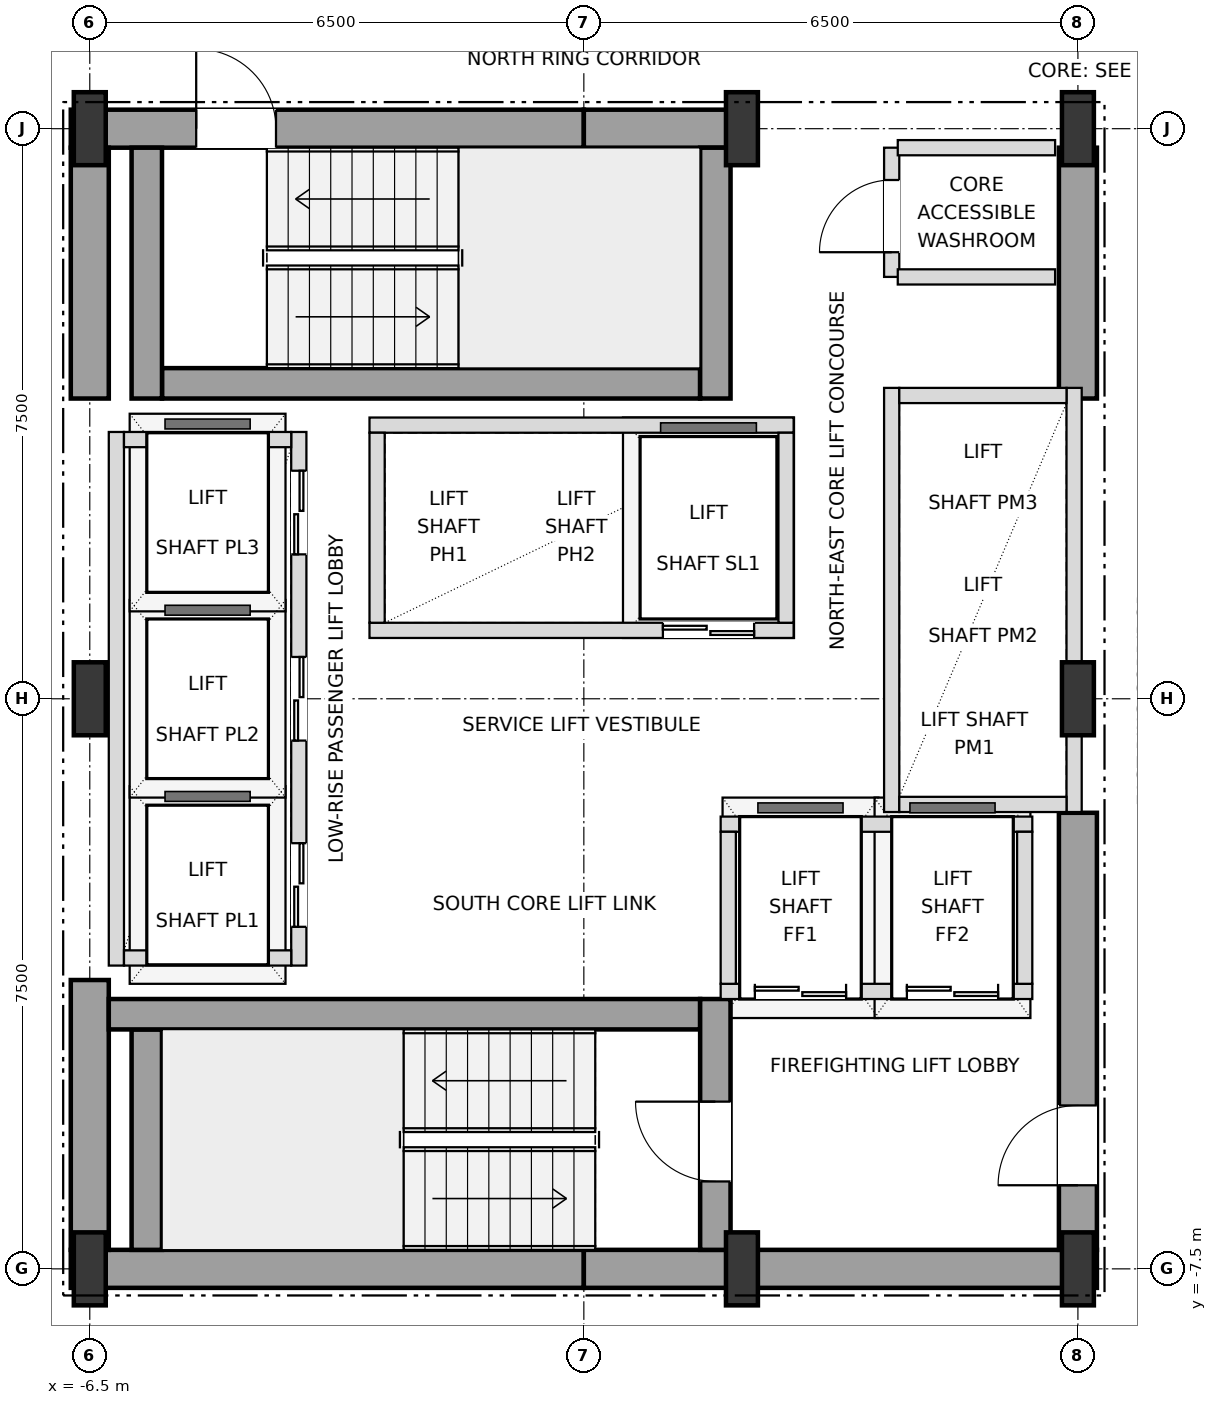
"""IFC4 building model, lengths in metres.
Left out: names, types, materials, properties, quantities, classifications, styles, units other than length and angle.
Written with IfcOpenShell. Run it as: python <this file> out.ifc"""

import sys

from ifc_helpers import new_model, si_unit, direction, frame, frame_2d, origin, origin_2d, place, context, subcontext, project, spatial, rectangle, i_section, extrude, element, fill, save


model = new_model("IFC4")
c1 = context("Model", 3, precision=1e-05, world=origin(), true_north=direction((0.0, 1.0)))
c2 = subcontext(c1, "Body", "Model", "MODEL_VIEW")
j1 = project(units=[si_unit("LENGTHUNIT", "METRE"), si_unit("PLANEANGLEUNIT", "RADIAN")], contexts=[c1])
p1 = place(None, origin())
s1 = spatial("IfcSite", under=j1, at=p1, CompositionType="ELEMENT")
p2 = place(p1, origin())
s2 = spatial("IfcBuilding", under=s1, at=p2, CompositionType="ELEMENT")
p3 = place(p2, frame((0.0, 0.0, 72.0)))
s3 = spatial("IfcBuildingStorey", under=s2, at=p3, CompositionType="ELEMENT", Elevation=72.0)
for number, where, z_axis, x_axis in (
    (1, (-6.5, -7.5, 0.0), (0.0, 0.0, 1.0), (1.0, 0.0, 0.0)),
    (2, (2.08, -7.5, 0.0), (0.0, 0.0, 1.0), (1.0, 0.0, 0.0)),
    (3, (6.5, -7.5, 0.0), (0.0, 0.0, 1.0), (1.0, 0.0, 0.0)),
    (4, (-6.5, 0.0, 0.0), (0.0, 0.0, 1.0), (1.0, 0.0, 0.0)),
    (5, (6.5, 0.0, 0.0), (0.0, 0.0, 1.0), (1.0, 0.0, 0.0)),
    (6, (-6.5, 7.5, 0.0), (0.0, 0.0, 1.0), (1.0, 0.0, 0.0)),
    (7, (2.08, 7.5, 0.0), (0.0, 0.0, 1.0), (1.0, 0.0, 0.0)),
    (8, (6.5, 7.5, 0.0), (0.0, 0.0, 1.0), (1.0, 0.0, 0.0)),
):
    element("IfcColumn", number, at=place(p3, frame(where, z_axis=z_axis, x_axis=x_axis)), inside=s3, PredefinedType="COLUMN", context=c2, shape_type="SweptSolid", body=[
        extrude(i_section(OverallWidth=0.42, OverallDepth=0.96, WebThickness=0.022, FlangeThickness=0.034, at=origin_2d()), origin(), (0.0, 0.0, 1.0), 3.6),
    ])
for number, where, z_axis, x_axis in (
    (9, (-6.75, -7.5, 0.0), (0.0, 0.0, 1.0), (1.0, 0.0, 0.0)),
    (10, (0.0, -7.5, 0.0), (0.0, 0.0, 1.0), (1.0, 0.0, 0.0)),
):
    element("IfcWall", number, at=place(p3, frame(where, z_axis=z_axis, x_axis=x_axis)), inside=s3, PredefinedType="SHEAR", context=c2, shape_type="SweptSolid", body=[
        extrude(rectangle(XDim=6.75, YDim=0.5, at=frame_2d((3.375, 0.0))), origin(), (0.0, 0.0, 1.0), 3.38),
    ])
p4 = place(p3, frame((-6.75, 7.5, 0.0), z_axis=(0.0, 0.0, 1.0), x_axis=(1.0, 0.0, 0.0)))
e11 = element("IfcWall", 11, at=p4, inside=s3, PredefinedType="SHEAR", context=c2, shape_type="SweptSolid", body=[
    extrude(rectangle(XDim=6.75, YDim=0.5, at=frame_2d((3.375, 0.0))), origin(), (0.0, 0.0, 1.0), 3.38),
])
p5 = place(p4, frame((1.65, 0.0, 0.0)))
e12 = element("IfcOpeningElement", 12, at=p5, cuts=e11, PredefinedType="OPENING", context=c2, shape_type="SweptSolid", body=[
    extrude(rectangle(XDim=1.05, YDim=2.15, at=frame_2d((0.525, 1.075))), frame((0.0, 0.26, 0.0), z_axis=(0.0, -1.0, 0.0), x_axis=(1.0, 0.0, 0.0)), (0.0, 0.0, 1.0), 0.52),
])
p6 = place(p3, frame((0.0, 7.5, 0.0), z_axis=(0.0, 0.0, 1.0), x_axis=(1.0, 0.0, 0.0)))
e13 = element("IfcWall", 13, at=p6, inside=s3, PredefinedType="SHEAR", context=c2, shape_type="SweptSolid", body=[
    extrude(rectangle(XDim=2.08, YDim=0.5, at=frame_2d((1.04, 0.0))), origin(), (0.0, 0.0, 1.0), 3.38),
])
p7 = place(p3, frame((-6.5, -7.25, 0.0), z_axis=(0.0, 0.0, 1.0), x_axis=(0.0, 1.0, 0.0)))
e14 = element("IfcWall", 14, at=p7, inside=s3, PredefinedType="SHEAR", context=c2, shape_type="SweptSolid", body=[
    extrude(rectangle(XDim=3.55, YDim=0.5, at=frame_2d((1.775, 0.0))), origin(), (0.0, 0.0, 1.0), 3.38),
])
p8 = place(p3, frame((-6.5, 3.95, 0.0), z_axis=(0.0, 0.0, 1.0), x_axis=(0.0, 1.0, 0.0)))
e15 = element("IfcWall", 15, at=p8, inside=s3, PredefinedType="SHEAR", context=c2, shape_type="SweptSolid", body=[
    extrude(rectangle(XDim=3.3, YDim=0.5, at=frame_2d((1.65, 0.0))), origin(), (0.0, 0.0, 1.0), 3.38),
])
p9 = place(p3, frame((6.5, -7.25, 0.0), z_axis=(0.0, 0.0, 1.0), x_axis=(0.0, 1.0, 0.0)))
e16 = element("IfcWall", 16, at=p9, inside=s3, PredefinedType="SHEAR", context=c2, shape_type="SweptSolid", body=[
    extrude(rectangle(XDim=5.75, YDim=0.5, at=frame_2d((2.875, 0.0))), origin(), (0.0, 0.0, 1.0), 3.38),
])
p10 = place(p9, frame((0.85, 0.0, 0.0)))
e17 = element("IfcOpeningElement", 17, at=p10, cuts=e16, PredefinedType="OPENING", context=c2, shape_type="SweptSolid", body=[
    extrude(rectangle(XDim=1.05, YDim=2.15, at=frame_2d((0.525, 1.075))), frame((0.0, 0.26, 0.0), z_axis=(0.0, -1.0, 0.0), x_axis=(1.0, 0.0, 0.0)), (0.0, 0.0, 1.0), 0.52),
])
p11 = place(p3, frame((6.5, 3.95, 0.0), z_axis=(0.0, 0.0, 1.0), x_axis=(0.0, 1.0, 0.0)))
e18 = element("IfcWall", 18, at=p11, inside=s3, PredefinedType="SHEAR", context=c2, shape_type="SweptSolid", body=[
    extrude(rectangle(XDim=3.3, YDim=0.5, at=frame_2d((1.65, 0.0))), origin(), (0.0, 0.0, 1.0), 3.38),
])
p12 = place(p3, frame((-5.75, -7.25, 0.0), z_axis=(0.0, 0.0, 1.0), x_axis=(0.0, 1.0, 0.0)))
e19 = element("IfcWall", 19, at=p12, inside=s3, PredefinedType="SHEAR", context=c2, shape_type="SweptSolid", body=[
    extrude(rectangle(XDim=2.9, YDim=0.4, at=frame_2d((1.45, 0.0))), origin(), (0.0, 0.0, 1.0), 3.38),
])
p13 = place(p3, frame((-6.25, -4.15, 0.0), z_axis=(0.0, 0.0, 1.0), x_axis=(1.0, 0.0, 0.0)))
e20 = element("IfcWall", 20, at=p13, inside=s3, PredefinedType="SHEAR", context=c2, shape_type="SweptSolid", body=[
    extrude(rectangle(XDim=7.78, YDim=0.4, at=frame_2d((3.89, 0.0))), origin(), (0.0, 0.0, 1.0), 3.38),
])
p14 = place(p3, frame((1.73, -7.25, 0.0), z_axis=(0.0, 0.0, 1.0), x_axis=(0.0, 1.0, 0.0)))
e21 = element("IfcWall", 21, at=p14, inside=s3, PredefinedType="SHEAR", context=c2, shape_type="SweptSolid", body=[
    extrude(rectangle(XDim=3.3, YDim=0.4, at=frame_2d((1.65, 0.0))), origin(), (0.0, 0.0, 1.0), 3.38),
])
p15 = place(p14, frame((0.9, 0.0, 0.0)))
e22 = element("IfcOpeningElement", 22, at=p15, cuts=e21, PredefinedType="OPENING", context=c2, shape_type="SweptSolid", body=[
    extrude(rectangle(XDim=1.05, YDim=2.15, at=frame_2d((0.525, 1.075))), frame((0.0, 0.21, 0.0), z_axis=(0.0, -1.0, 0.0), x_axis=(1.0, 0.0, 0.0)), (0.0, 0.0, 1.0), 0.42),
])
p16 = place(p3, frame((-5.55, 4.15, 0.0), z_axis=(0.0, 0.0, 1.0), x_axis=(1.0, 0.0, 0.0)))
e23 = element("IfcWall", 23, at=p16, inside=s3, PredefinedType="SHEAR", context=c2, shape_type="SweptSolid", body=[
    extrude(rectangle(XDim=7.08, YDim=0.4, at=frame_2d((3.54, 0.0))), origin(), (0.0, 0.0, 1.0), 3.38),
])
for number, where, z_axis, x_axis in (
    (24, (1.73, 3.95, 0.0), (0.0, 0.0, 1.0), (0.0, 1.0, 0.0)),
    (25, (-5.75, 3.95, 0.0), (0.0, 0.0, 1.0), (0.0, 1.0, 0.0)),
):
    element("IfcWall", number, at=place(p3, frame(where, z_axis=z_axis, x_axis=x_axis)), inside=s3, PredefinedType="SHEAR", context=c2, shape_type="SweptSolid", body=[
        extrude(rectangle(XDim=3.3, YDim=0.4, at=frame_2d((1.65, 0.0))), origin(), (0.0, 0.0, 1.0), 3.38),
    ])
p17 = place(p3, frame((-3.75, -3.51, 0.0), z_axis=(0.0, 0.0, 1.0), x_axis=(0.0, 1.0, 0.0)))
e26 = element("IfcWall", 26, at=p17, inside=s3, PredefinedType="SOLIDWALL", context=c2, shape_type="SweptSolid", body=[
    extrude(rectangle(XDim=7.02, YDim=0.2, at=frame_2d((3.51, 0.0))), origin(), (0.0, 0.0, 1.0), 3.38),
])
p18 = place(p17, frame((0.51, 0.0, 0.0)))
e27 = element("IfcOpeningElement", 27, at=p18, cuts=e26, PredefinedType="OPENING", context=c2, shape_type="SweptSolid", body=[
    extrude(rectangle(XDim=1.1, YDim=2.15, at=frame_2d((0.55, 1.075))), frame((0.0, 0.11, 0.0), z_axis=(0.0, -1.0, 0.0), x_axis=(1.0, 0.0, 0.0)), (0.0, 0.0, 1.0), 0.22),
])
p19 = place(p17, frame((2.96, 0.0, 0.0)))
e28 = element("IfcOpeningElement", 28, at=p19, cuts=e26, PredefinedType="OPENING", context=c2, shape_type="SweptSolid", body=[
    extrude(rectangle(XDim=1.1, YDim=2.15, at=frame_2d((0.55, 1.075))), frame((0.0, 0.11, 0.0), z_axis=(0.0, -1.0, 0.0), x_axis=(1.0, 0.0, 0.0)), (0.0, 0.0, 1.0), 0.22),
])
p20 = place(p17, frame((5.41, 0.0, 0.0)))
e29 = element("IfcOpeningElement", 29, at=p20, cuts=e26, PredefinedType="OPENING", context=c2, shape_type="SweptSolid", body=[
    extrude(rectangle(XDim=1.1, YDim=2.15, at=frame_2d((0.55, 1.075))), frame((0.0, 0.11, 0.0), z_axis=(0.0, -1.0, 0.0), x_axis=(1.0, 0.0, 0.0)), (0.0, 0.0, 1.0), 0.22),
])
p21 = place(p3, frame((-6.15, -3.51, 0.0), z_axis=(0.0, 0.0, 1.0), x_axis=(0.0, 1.0, 0.0)))
e30 = element("IfcWall", 30, at=p21, inside=s3, PredefinedType="SOLIDWALL", context=c2, shape_type="SweptSolid", body=[
    extrude(rectangle(XDim=7.02, YDim=0.2, at=frame_2d((3.51, 0.0))), origin(), (0.0, 0.0, 1.0), 3.38),
])
for number, where, z_axis, x_axis in (
    (31, (-6.05, -3.41, 0.0), (0.0, 0.0, 1.0), (1.0, 0.0, 0.0)),
    (32, (-6.05, 3.41, 0.0), (0.0, 0.0, 1.0), (1.0, 0.0, 0.0)),
):
    element("IfcWall", number, at=place(p3, frame(where, z_axis=z_axis, x_axis=x_axis)), inside=s3, PredefinedType="SOLIDWALL", context=c2, shape_type="SweptSolid", body=[
        extrude(rectangle(XDim=2.2, YDim=0.2, at=frame_2d((1.1, 0.0))), origin(), (0.0, 0.0, 1.0), 3.38),
    ])
p22 = place(p3, frame((4.05, -1.49, 0.0), z_axis=(0.0, 0.0, 1.0), x_axis=(0.0, 1.0, 0.0)))
e33 = element("IfcWall", 33, at=p22, inside=s3, PredefinedType="SOLIDWALL", context=c2, shape_type="SweptSolid", body=[
    extrude(rectangle(XDim=5.58, YDim=0.2, at=frame_2d((2.79, 0.0))), origin(), (0.0, 0.0, 1.0), 3.38),
])
p23 = place(p3, frame((6.45, -1.49, 0.0), z_axis=(0.0, 0.0, 1.0), x_axis=(0.0, 1.0, 0.0)))
e34 = element("IfcWall", 34, at=p23, inside=s3, PredefinedType="SOLIDWALL", context=c2, shape_type="SweptSolid", body=[
    extrude(rectangle(XDim=5.58, YDim=0.2, at=frame_2d((2.79, 0.0))), origin(), (0.0, 0.0, 1.0), 2.816),
])
for number, where, z_axis, x_axis in (
    (35, (4.15, -1.39, 0.0), (0.0, 0.0, 1.0), (1.0, 0.0, 0.0)),
    (36, (4.15, 3.99, 0.0), (0.0, 0.0, 1.0), (1.0, 0.0, 0.0)),
):
    element("IfcWall", number, at=place(p3, frame(where, z_axis=z_axis, x_axis=x_axis)), inside=s3, PredefinedType="SOLIDWALL", context=c2, shape_type="SweptSolid", body=[
        extrude(rectangle(XDim=2.2, YDim=0.2, at=frame_2d((1.1, 0.0))), origin(), (0.0, 0.0, 1.0), 3.38),
    ])
p24 = place(p3, frame((-2.82, 0.9, 0.0), z_axis=(0.0, 0.0, 1.0), x_axis=(1.0, 0.0, 0.0)))
e37 = element("IfcWall", 37, at=p24, inside=s3, PredefinedType="SOLIDWALL", context=c2, shape_type="SweptSolid", body=[
    extrude(rectangle(XDim=5.58, YDim=0.2, at=frame_2d((2.79, 0.0))), origin(), (0.0, 0.0, 1.0), 3.38),
])
p25 = place(p24, frame((3.86, 0.0, 0.0)))
e38 = element("IfcOpeningElement", 38, at=p25, cuts=e37, PredefinedType="OPENING", context=c2, shape_type="SweptSolid", body=[
    extrude(rectangle(XDim=1.2, YDim=2.2, at=frame_2d((0.6, 1.1))), frame((0.0, 0.11, 0.0), z_axis=(0.0, -1.0, 0.0), x_axis=(1.0, 0.0, 0.0)), (0.0, 0.0, 1.0), 0.22),
])
p26 = place(p3, frame((-2.82, 3.6, 0.0), z_axis=(0.0, 0.0, 1.0), x_axis=(1.0, 0.0, 0.0)))
e39 = element("IfcWall", 39, at=p26, inside=s3, PredefinedType="SOLIDWALL", context=c2, shape_type="SweptSolid", body=[
    extrude(rectangle(XDim=5.58, YDim=0.2, at=frame_2d((2.79, 0.0))), origin(), (0.0, 0.0, 1.0), 3.38),
])
for number, where, z_axis, x_axis in (
    (40, (-2.72, 1.0, 0.0), (0.0, 0.0, 1.0), (0.0, 1.0, 0.0)),
    (41, (2.66, 1.0, 0.0), (0.0, 0.0, 1.0), (0.0, 1.0, 0.0)),
):
    element("IfcWall", number, at=place(p3, frame(where, z_axis=z_axis, x_axis=x_axis)), inside=s3, PredefinedType="SOLIDWALL", context=c2, shape_type="SweptSolid", body=[
        extrude(rectangle(XDim=2.5, YDim=0.2, at=frame_2d((1.25, 0.0))), origin(), (0.0, 0.0, 1.0), 3.38),
    ])
p27 = place(p3, frame((1.8, -3.85, 0.0), z_axis=(0.0, 0.0, 1.0), x_axis=(1.0, 0.0, 0.0)))
e42 = element("IfcWall", 42, at=p27, inside=s3, PredefinedType="SOLIDWALL", context=c2, shape_type="SweptSolid", body=[
    extrude(rectangle(XDim=4.1, YDim=0.2, at=frame_2d((2.05, 0.0))), origin(), (0.0, 0.0, 1.0), 3.38),
])
p28 = place(p27, frame((0.45, 0.0, 0.0)))
e43 = element("IfcOpeningElement", 43, at=p28, cuts=e42, PredefinedType="OPENING", context=c2, shape_type="SweptSolid", body=[
    extrude(rectangle(XDim=1.2, YDim=2.2, at=frame_2d((0.6, 1.1))), frame((0.0, 0.11, 0.0), z_axis=(0.0, -1.0, 0.0), x_axis=(1.0, 0.0, 0.0)), (0.0, 0.0, 1.0), 0.22),
])
p29 = place(p27, frame((2.45, 0.0, 0.0)))
e44 = element("IfcOpeningElement", 44, at=p29, cuts=e42, PredefinedType="OPENING", context=c2, shape_type="SweptSolid", body=[
    extrude(rectangle(XDim=1.2, YDim=2.2, at=frame_2d((0.6, 1.1))), frame((0.0, 0.11, 0.0), z_axis=(0.0, -1.0, 0.0), x_axis=(1.0, 0.0, 0.0)), (0.0, 0.0, 1.0), 0.22),
])
p30 = place(p3, frame((1.8, -1.65, 0.0), z_axis=(0.0, 0.0, 1.0), x_axis=(1.0, 0.0, 0.0)))
e45 = element("IfcWall", 45, at=p30, inside=s3, PredefinedType="SOLIDWALL", context=c2, shape_type="SweptSolid", body=[
    extrude(rectangle(XDim=4.1, YDim=0.2, at=frame_2d((2.05, 0.0))), origin(), (0.0, 0.0, 1.0), 3.38),
])
for number, where, z_axis, x_axis in (
    (46, (1.9, -3.75, 0.0), (0.0, 0.0, 1.0), (0.0, 1.0, 0.0)),
    (47, (5.8, -3.75, 0.0), (0.0, 0.0, 1.0), (0.0, 1.0, 0.0)),
):
    element("IfcWall", number, at=place(p3, frame(where, z_axis=z_axis, x_axis=x_axis)), inside=s3, PredefinedType="SOLIDWALL", context=c2, shape_type="SweptSolid", body=[
        extrude(rectangle(XDim=2.0, YDim=0.2, at=frame_2d((1.0, 0.0))), origin(), (0.0, 0.0, 1.0), 3.38),
    ])
p31 = place(p3, frame((4.05, 5.55, 0.0), z_axis=(0.0, 0.0, 1.0), x_axis=(0.0, 1.0, 0.0)))
e48 = element("IfcWall", 48, at=p31, inside=s3, PredefinedType="SOLIDWALL", context=c2, shape_type="SweptSolid", body=[
    extrude(rectangle(XDim=1.7, YDim=0.2, at=frame_2d((0.85, 0.0))), origin(), (0.0, 0.0, 1.0), 3.38),
])
p32 = place(p31, frame((0.325, 0.0, 0.0)))
e49 = element("IfcOpeningElement", 49, at=p32, cuts=e48, PredefinedType="OPENING", context=c2, shape_type="SweptSolid", body=[
    extrude(rectangle(XDim=0.95, YDim=2.15, at=frame_2d((0.475, 1.075))), frame((0.0, 0.11, 0.0), z_axis=(0.0, -1.0, 0.0), x_axis=(1.0, 0.0, 0.0)), (0.0, 0.0, 1.0), 0.22),
])
for number, where, z_axis, x_axis in (
    (50, (4.13, 5.55, 0.0), (0.0, 0.0, 1.0), (1.0, 0.0, 0.0)),
    (51, (4.13, 7.25, 0.0), (0.0, 0.0, 1.0), (1.0, 0.0, 0.0)),
):
    element("IfcWall", number, at=place(p3, frame(where, z_axis=z_axis, x_axis=x_axis)), inside=s3, PredefinedType="SOLIDWALL", context=c2, shape_type="SweptSolid", body=[
        extrude(rectangle(XDim=2.07, YDim=0.2, at=frame_2d((1.035, 0.0))), origin(), (0.0, 0.0, 1.0), 3.38),
    ])
p33 = place(p10, origin())
e52 = element("IfcDoor", 52, at=p33, inside=s3, OperationType="SINGLE_SWING_LEFT", PredefinedType="DOOR", context=c2, shape_type="SweptSolid", body=[
    extrude(rectangle(XDim=1.05, YDim=2.15, at=frame_2d((0.525, 1.075))), frame((0.0, 0.025, 0.0), z_axis=(0.0, -1.0, 0.0), x_axis=(1.0, 0.0, 0.0)), (0.0, 0.0, 1.0), 0.05),
])
fill(e17, e52)
p34 = place(p15, origin())
e53 = element("IfcDoor", 53, at=p34, inside=s3, OperationType="SINGLE_SWING_RIGHT", PredefinedType="DOOR", context=c2, shape_type="SweptSolid", body=[
    extrude(rectangle(XDim=1.05, YDim=2.15, at=frame_2d((0.525, 1.075))), frame((0.0, 0.025, 0.0), z_axis=(0.0, -1.0, 0.0), x_axis=(1.0, 0.0, 0.0)), (0.0, 0.0, 1.0), 0.05),
])
fill(e22, e53)
p35 = place(p5, origin())
e54 = element("IfcDoor", 54, at=p35, inside=s3, OperationType="SINGLE_SWING_LEFT", PredefinedType="DOOR", context=c2, shape_type="SweptSolid", body=[
    extrude(rectangle(XDim=1.05, YDim=2.15, at=frame_2d((0.525, 1.075))), frame((0.0, 0.025, 0.0), z_axis=(0.0, -1.0, 0.0), x_axis=(1.0, 0.0, 0.0)), (0.0, 0.0, 1.0), 0.05),
])
fill(e12, e54)
p36 = place(p18, origin())
e55 = element("IfcDoor", 55, at=p36, inside=s3, OperationType="DOUBLE_DOOR_SLIDING", PredefinedType="DOOR", context=c2, shape_type="SweptSolid", body=[
    extrude(rectangle(XDim=1.1, YDim=2.15, at=frame_2d((0.55, 1.075))), frame((0.0, 0.025, 0.0), z_axis=(0.0, -1.0, 0.0), x_axis=(1.0, 0.0, 0.0)), (0.0, 0.0, 1.0), 0.05),
])
fill(e27, e55)
p37 = place(p19, origin())
e56 = element("IfcDoor", 56, at=p37, inside=s3, OperationType="DOUBLE_DOOR_SLIDING", PredefinedType="DOOR", context=c2, shape_type="SweptSolid", body=[
    extrude(rectangle(XDim=1.1, YDim=2.15, at=frame_2d((0.55, 1.075))), frame((0.0, 0.025, 0.0), z_axis=(0.0, -1.0, 0.0), x_axis=(1.0, 0.0, 0.0)), (0.0, 0.0, 1.0), 0.05),
])
fill(e28, e56)
p38 = place(p20, origin())
e57 = element("IfcDoor", 57, at=p38, inside=s3, OperationType="DOUBLE_DOOR_SLIDING", PredefinedType="DOOR", context=c2, shape_type="SweptSolid", body=[
    extrude(rectangle(XDim=1.1, YDim=2.15, at=frame_2d((0.55, 1.075))), frame((0.0, 0.025, 0.0), z_axis=(0.0, -1.0, 0.0), x_axis=(1.0, 0.0, 0.0)), (0.0, 0.0, 1.0), 0.05),
])
fill(e29, e57)
p39 = place(p25, origin())
e58 = element("IfcDoor", 58, at=p39, inside=s3, OperationType="DOUBLE_DOOR_SLIDING", PredefinedType="DOOR", context=c2, shape_type="SweptSolid", body=[
    extrude(rectangle(XDim=1.2, YDim=2.2, at=frame_2d((0.6, 1.1))), frame((0.0, 0.025, 0.0), z_axis=(0.0, -1.0, 0.0), x_axis=(1.0, 0.0, 0.0)), (0.0, 0.0, 1.0), 0.05),
])
fill(e38, e58)
p40 = place(p28, origin())
e59 = element("IfcDoor", 59, at=p40, inside=s3, OperationType="DOUBLE_DOOR_SLIDING", PredefinedType="DOOR", context=c2, shape_type="SweptSolid", body=[
    extrude(rectangle(XDim=1.2, YDim=2.2, at=frame_2d((0.6, 1.1))), frame((0.0, 0.025, 0.0), z_axis=(0.0, -1.0, 0.0), x_axis=(1.0, 0.0, 0.0)), (0.0, 0.0, 1.0), 0.05),
])
fill(e43, e59)
p41 = place(p29, origin())
e60 = element("IfcDoor", 60, at=p41, inside=s3, OperationType="DOUBLE_DOOR_SLIDING", PredefinedType="DOOR", context=c2, shape_type="SweptSolid", body=[
    extrude(rectangle(XDim=1.2, YDim=2.2, at=frame_2d((0.6, 1.1))), frame((0.0, 0.025, 0.0), z_axis=(0.0, -1.0, 0.0), x_axis=(1.0, 0.0, 0.0)), (0.0, 0.0, 1.0), 0.05),
])
fill(e44, e60)
p42 = place(p32, origin())
e61 = element("IfcDoor", 61, at=p42, inside=s3, OperationType="SINGLE_SWING_LEFT", PredefinedType="DOOR", context=c2, shape_type="SweptSolid", body=[
    extrude(rectangle(XDim=0.95, YDim=2.15, at=frame_2d((0.475, 1.075))), frame((0.0, 0.025, 0.0), z_axis=(0.0, -1.0, 0.0), x_axis=(1.0, 0.0, 0.0)), (0.0, 0.0, 1.0), 0.05),
])
fill(e49, e61)
save(model, sys.argv[1])
